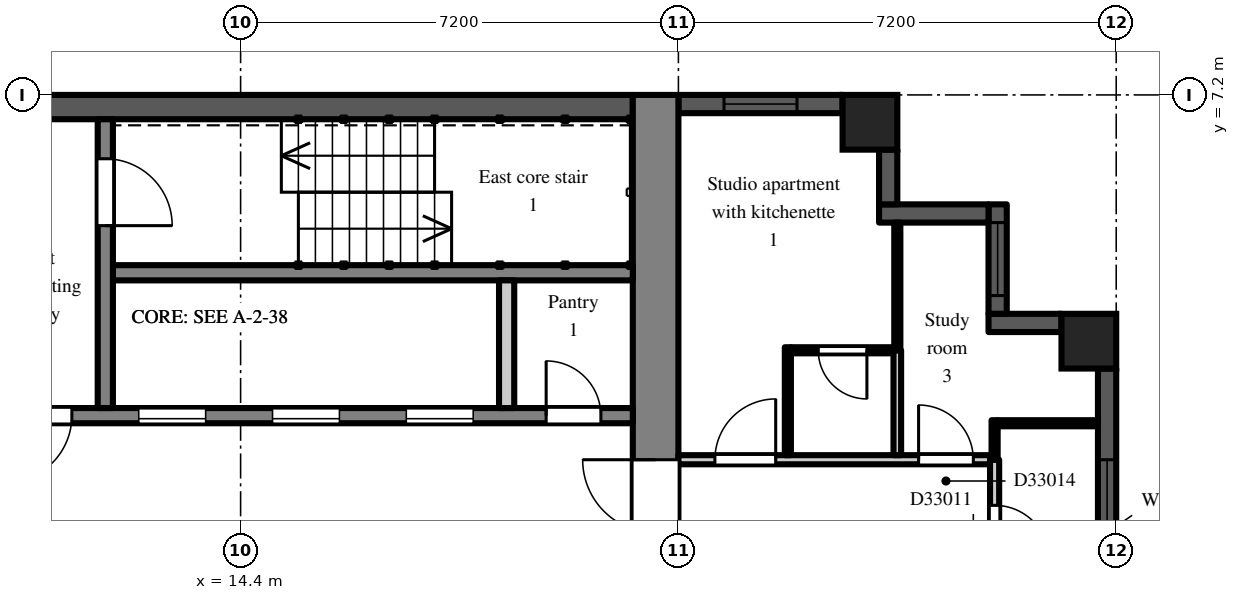
"""IFC4 building model, lengths in metres.
Left out: names, types, materials, properties, quantities, classifications, styles, units other than length and angle.
Written with IfcOpenShell. Run it as: python <this file> out.ifc"""

import sys

from ifc_helpers import new_model, si_unit, direction, frame, frame_2d, origin, origin_2d, place, context, subcontext, project, spatial, rectangle, extrude, element, fill, save


model = new_model("IFC4")
c1 = context("Model", 3, precision=1e-05, world=origin(), true_north=direction((0.0, 1.0)))
c2 = subcontext(c1, "Body", "Model", "MODEL_VIEW")
j1 = project(units=[si_unit("LENGTHUNIT", "METRE"), si_unit("PLANEANGLEUNIT", "RADIAN")], contexts=[c1])
p1 = place(None, origin())
s1 = spatial("IfcSite", under=j1, at=p1, CompositionType="ELEMENT")
p2 = place(p1, origin())
s2 = spatial("IfcBuilding", under=s1, at=p2, CompositionType="ELEMENT")
p3 = place(p2, frame((0.0, 0.0, 231.9)))
s3 = spatial("IfcBuildingStorey", under=s2, at=p3, CompositionType="ELEMENT", Elevation=231.9)
for number, where, z_axis, x_axis in (
    (1, (24.75, 6.75, 0.0), (0.0, 0.0, 1.0), (1.0, 0.0, 0.0)),
    (2, (28.35, 3.15, 0.0), (0.0, 0.0, 1.0), (1.0, 0.0, 0.0)),
):
    element("IfcColumn", number, at=place(p3, frame(where, z_axis=z_axis, x_axis=x_axis)), inside=s3, PredefinedType="COLUMN", context=c2, shape_type="SweptSolid", body=[
        extrude(rectangle(XDim=0.9, YDim=0.9, at=origin_2d()), origin(), (0.0, 0.0, 1.0), 3.0),
    ])
p4 = place(p3, frame((28.65, -2.7, 0.0), z_axis=(0.0, 0.0, 1.0), x_axis=(0.0, 1.0, 0.0)))
e3 = element("IfcWall", 3, at=p4, inside=s3, PredefinedType="SOLIDWALL", context=c2, shape_type="SweptSolid", body=[
    extrude(rectangle(XDim=5.4, YDim=0.3, at=frame_2d((2.7, 0.0))), origin(), (0.0, 0.0, 1.0), 2.3),
])
p5 = place(p4, frame((1.5, 0.0, 0.2)))
e4 = element("IfcOpeningElement", 4, at=p5, cuts=e3, PredefinedType="OPENING", context=c2, shape_type="SweptSolid", body=[
    extrude(rectangle(XDim=2.4, YDim=1.85, at=frame_2d((1.2, 0.925))), frame((0.0, 0.16, 0.0), z_axis=(0.0, -1.0, 0.0), x_axis=(1.0, 0.0, 0.0)), (0.0, 0.0, 1.0), 0.32),
])
p6 = place(p3, frame((27.9, 3.45, 0.0), z_axis=(0.0, 0.0, 1.0), x_axis=(-1.0, 0.0, 0.0)))
e5 = element("IfcWall", 5, at=p6, inside=s3, PredefinedType="SOLIDWALL", context=c2, shape_type="SweptSolid", body=[
    extrude(rectangle(XDim=1.2, YDim=0.3, at=frame_2d((0.6, 0.0))), origin(), (0.0, 0.0, 1.0), 2.6),
])
p7 = place(p3, frame((26.85, 3.6, 0.0), z_axis=(0.0, 0.0, 1.0), x_axis=(0.0, 1.0, 0.0)))
e6 = element("IfcWall", 6, at=p7, inside=s3, PredefinedType="SOLIDWALL", context=c2, shape_type="SweptSolid", body=[
    extrude(rectangle(XDim=1.8, YDim=0.3, at=frame_2d((0.9, 0.0))), origin(), (0.0, 0.0, 1.0), 2.6),
])
p8 = place(p7, frame((0.3, 0.0, 0.2)))
e7 = element("IfcOpeningElement", 7, at=p8, cuts=e6, PredefinedType="OPENING", context=c2, shape_type="SweptSolid", body=[
    extrude(rectangle(XDim=1.2, YDim=1.85, at=frame_2d((0.6, 0.925))), frame((0.0, 0.16, 0.0), z_axis=(0.0, -1.0, 0.0), x_axis=(1.0, 0.0, 0.0)), (0.0, 0.0, 1.0), 0.32),
])
p9 = place(p3, frame((26.7, 5.25, 0.0), z_axis=(0.0, 0.0, 1.0), x_axis=(-1.0, 0.0, 0.0)))
e8 = element("IfcWall", 8, at=p9, inside=s3, PredefinedType="SOLIDWALL", context=c2, shape_type="SweptSolid", body=[
    extrude(rectangle(XDim=1.8, YDim=0.3, at=frame_2d((0.9, 0.0))), origin(), (0.0, 0.0, 1.0), 2.6),
])
p10 = place(p3, frame((25.05, 5.4, 0.0), z_axis=(0.0, 0.0, 1.0), x_axis=(0.0, 1.0, 0.0)))
e9 = element("IfcWall", 9, at=p10, inside=s3, PredefinedType="SOLIDWALL", context=c2, shape_type="SweptSolid", body=[
    extrude(rectangle(XDim=0.9, YDim=0.3, at=frame_2d((0.45, 0.0))), origin(), (0.0, 0.0, 1.0), 2.6),
])
p11 = place(p3, frame((24.3, 7.05, 0.0), z_axis=(0.0, 0.0, 1.0), x_axis=(-1.0, 0.0, 0.0)))
e10 = element("IfcWall", 10, at=p11, inside=s3, PredefinedType="SOLIDWALL", context=c2, shape_type="SweptSolid", body=[
    extrude(rectangle(XDim=2.7, YDim=0.3, at=frame_2d((1.35, 0.0))), origin(), (0.0, 0.0, 1.0), 2.3),
])
p12 = place(p11, frame((0.75, 0.0, 0.2)))
e11 = element("IfcOpeningElement", 11, at=p12, cuts=e10, PredefinedType="OPENING", context=c2, shape_type="SweptSolid", body=[
    extrude(rectangle(XDim=1.2, YDim=1.85, at=frame_2d((0.6, 0.925))), frame((0.0, 0.16, 0.0), z_axis=(0.0, -1.0, 0.0), x_axis=(1.0, 0.0, 0.0)), (0.0, 0.0, 1.0), 0.32),
])
p13 = place(p3, frame((21.225, -7.2, 0.0), z_axis=(0.0, 0.0, 1.0), x_axis=(0.0, 1.0, 0.0)))
e12 = element("IfcWall", 12, at=p13, inside=s3, PredefinedType="SHEAR", context=c2, shape_type="SweptSolid", body=[
    extrude(rectangle(XDim=14.4, YDim=0.75, at=frame_2d((7.2, 0.0))), origin(), (0.0, 0.0, 1.0), 2.6),
])
p14 = place(p13, frame((6.0, 0.0, 0.0)))
e13 = element("IfcOpeningElement", 13, at=p14, cuts=e12, PredefinedType="OPENING", context=c2, shape_type="SweptSolid", body=[
    extrude(rectangle(XDim=2.4, YDim=2.2, at=frame_2d((1.2, 1.1))), frame((0.0, 0.385, 0.0), z_axis=(0.0, -1.0, 0.0), x_axis=(1.0, 0.0, 0.0)), (0.0, 0.0, 1.0), 0.77),
])
p15 = place(p3, frame((7.9, 7.0, 0.0), z_axis=(0.0, 0.0, 1.0), x_axis=(1.0, 0.0, 0.0)))
e14 = element("IfcWall", 14, at=p15, inside=s3, PredefinedType="SHEAR", context=c2, shape_type="SweptSolid", body=[
    extrude(rectangle(XDim=12.95, YDim=0.4, at=frame_2d((6.475, 0.0))), origin(), (0.0, 0.0, 1.0), 2.6),
])
p16 = place(p3, frame((7.9, 1.925, 0.0), z_axis=(0.0, 0.0, 1.0), x_axis=(1.0, 0.0, 0.0)))
e15 = element("IfcWall", 15, at=p16, inside=s3, PredefinedType="SHEAR", context=c2, shape_type="SweptSolid", body=[
    extrude(rectangle(XDim=12.95, YDim=0.25, at=frame_2d((6.475, 0.0))), origin(), (0.0, 0.0, 1.0), 2.6),
])
p17 = place(p16, frame((4.825, 0.0, 0.0)))
e16 = element("IfcOpeningElement", 16, at=p17, cuts=e15, PredefinedType="OPENING", context=c2, shape_type="SweptSolid", body=[
    extrude(rectangle(XDim=1.1, YDim=2.1, at=frame_2d((0.55, 1.05))), frame((0.0, 0.135, 0.0), z_axis=(0.0, -1.0, 0.0), x_axis=(1.0, 0.0, 0.0)), (0.0, 0.0, 1.0), 0.27),
])
p18 = place(p16, frame((7.025, 0.0, 0.0)))
e17 = element("IfcOpeningElement", 17, at=p18, cuts=e15, PredefinedType="OPENING", context=c2, shape_type="SweptSolid", body=[
    extrude(rectangle(XDim=1.1, YDim=2.1, at=frame_2d((0.55, 1.05))), frame((0.0, 0.135, 0.0), z_axis=(0.0, -1.0, 0.0), x_axis=(1.0, 0.0, 0.0)), (0.0, 0.0, 1.0), 0.27),
])
p19 = place(p16, frame((9.225, 0.0, 0.0)))
e18 = element("IfcOpeningElement", 18, at=p19, cuts=e15, PredefinedType="OPENING", context=c2, shape_type="SweptSolid", body=[
    extrude(rectangle(XDim=1.1, YDim=2.1, at=frame_2d((0.55, 1.05))), frame((0.0, 0.135, 0.0), z_axis=(0.0, -1.0, 0.0), x_axis=(1.0, 0.0, 0.0)), (0.0, 0.0, 1.0), 0.27),
])
p20 = place(p16, frame((0.525, 0.0, 0.0)))
e19 = element("IfcOpeningElement", 19, at=p20, cuts=e15, PredefinedType="OPENING", context=c2, shape_type="SweptSolid", body=[
    extrude(rectangle(XDim=0.9, YDim=2.1, at=frame_2d((0.45, 1.05))), frame((0.0, 0.135, 0.0), z_axis=(0.0, -1.0, 0.0), x_axis=(1.0, 0.0, 0.0)), (0.0, 0.0, 1.0), 0.27),
])
p21 = place(p16, frame((2.625, 0.0, 0.0)))
e20 = element("IfcOpeningElement", 20, at=p21, cuts=e15, PredefinedType="OPENING", context=c2, shape_type="SweptSolid", body=[
    extrude(rectangle(XDim=1.1, YDim=2.1, at=frame_2d((0.55, 1.05))), frame((0.0, 0.135, 0.0), z_axis=(0.0, -1.0, 0.0), x_axis=(1.0, 0.0, 0.0)), (0.0, 0.0, 1.0), 0.27),
])
p22 = place(p16, frame((11.525, 0.0, 0.0)))
e21 = element("IfcOpeningElement", 21, at=p22, cuts=e15, PredefinedType="OPENING", context=c2, shape_type="SweptSolid", body=[
    extrude(rectangle(XDim=0.9, YDim=2.1, at=frame_2d((0.45, 1.05))), frame((0.0, 0.135, 0.0), z_axis=(0.0, -1.0, 0.0), x_axis=(1.0, 0.0, 0.0)), (0.0, 0.0, 1.0), 0.27),
])
p23 = place(p3, frame((12.3, 4.275, 0.0), z_axis=(0.0, 0.0, 1.0), x_axis=(1.0, 0.0, 0.0)))
e22 = element("IfcWall", 22, at=p23, inside=s3, PredefinedType="SHEAR", context=c2, shape_type="SweptSolid", body=[
    extrude(rectangle(XDim=8.55, YDim=0.25, at=frame_2d((4.275, 0.0))), origin(), (0.0, 0.0, 1.0), 2.6),
])
p24 = place(p3, frame((12.175, 2.05, 0.0), z_axis=(0.0, 0.0, 1.0), x_axis=(0.0, 1.0, 0.0)))
e23 = element("IfcWall", 23, at=p24, inside=s3, PredefinedType="SHEAR", context=c2, shape_type="SweptSolid", body=[
    extrude(rectangle(XDim=4.75, YDim=0.25, at=frame_2d((2.375, 0.0))), origin(), (0.0, 0.0, 1.0), 2.6),
])
p25 = place(p24, frame((3.0, 0.0, 0.0)))
e24 = element("IfcOpeningElement", 24, at=p25, cuts=e23, PredefinedType="OPENING", context=c2, shape_type="SweptSolid", body=[
    extrude(rectangle(XDim=1.1, YDim=2.1, at=frame_2d((0.55, 1.05))), frame((0.0, 0.135, 0.0), z_axis=(0.0, -1.0, 0.0), x_axis=(1.0, 0.0, 0.0)), (0.0, 0.0, 1.0), 0.27),
])
p26 = place(p3, frame((18.775, 2.05, 0.0), z_axis=(0.0, 0.0, 1.0), x_axis=(0.0, 1.0, 0.0)))
e25 = element("IfcWall", 25, at=p26, inside=s3, PredefinedType="PARTITIONING", context=c2, shape_type="SweptSolid", body=[
    extrude(rectangle(XDim=2.1, YDim=0.25, at=frame_2d((1.05, 0.0))), origin(), (0.0, 0.0, 1.0), 2.6),
])
p27 = place(p3, frame((21.6, 1.2, 0.0), z_axis=(0.0, 0.0, 1.0), x_axis=(1.0, 0.0, 0.0)))
e26 = element("IfcWall", 26, at=p27, inside=s3, PredefinedType="PARTITIONING", context=c2, shape_type="SweptSolid", body=[
    extrude(rectangle(XDim=5.125, YDim=0.15, at=frame_2d((2.562, 0.0))), origin(), (0.0, 0.0, 1.0), 2.6),
])
p28 = place(p27, frame((0.6, 0.0, 0.0)))
e27 = element("IfcOpeningElement", 27, at=p28, cuts=e26, PredefinedType="OPENING", context=c2, shape_type="SweptSolid", body=[
    extrude(rectangle(XDim=1.0, YDim=2.1, at=frame_2d((0.5, 1.05))), frame((0.0, 0.085, 0.0), z_axis=(0.0, -1.0, 0.0), x_axis=(1.0, 0.0, 0.0)), (0.0, 0.0, 1.0), 0.17),
])
p29 = place(p27, frame((3.95, 0.0, 0.0)))
e28 = element("IfcOpeningElement", 28, at=p29, cuts=e26, PredefinedType="OPENING", context=c2, shape_type="SweptSolid", body=[
    extrude(rectangle(XDim=0.9, YDim=2.1, at=frame_2d((0.45, 1.05))), frame((0.0, 0.085, 0.0), z_axis=(0.0, -1.0, 0.0), x_axis=(1.0, 0.0, 0.0)), (0.0, 0.0, 1.0), 0.17),
])
p30 = place(p3, frame((23.4, 1.275, 0.0), z_axis=(0.0, 0.0, 1.0), x_axis=(0.0, 1.0, 0.0)))
e29 = element("IfcWall", 29, at=p30, inside=s3, PredefinedType="PARTITIONING", context=c2, shape_type="SweptSolid", body=[
    extrude(rectangle(XDim=1.775, YDim=0.1, at=frame_2d((0.888, 0.0))), origin(), (0.0, 0.0, 1.0), 2.6),
])
p31 = place(p3, frame((23.45, 3.0, 0.0), z_axis=(0.0, 0.0, 1.0), x_axis=(1.0, 0.0, 0.0)))
e30 = element("IfcWall", 30, at=p31, inside=s3, PredefinedType="PARTITIONING", context=c2, shape_type="SweptSolid", body=[
    extrude(rectangle(XDim=1.688, YDim=0.1, at=frame_2d((0.844, 0.0))), origin(), (0.0, 0.0, 1.0), 2.6),
])
p32 = place(p31, frame((0.45, 0.0, 0.0)))
e31 = element("IfcOpeningElement", 31, at=p32, cuts=e30, PredefinedType="OPENING", context=c2, shape_type="SweptSolid", body=[
    extrude(rectangle(XDim=0.8, YDim=2.1, at=frame_2d((0.4, 1.05))), frame((0.0, 0.06, 0.0), z_axis=(0.0, -1.0, 0.0), x_axis=(1.0, 0.0, 0.0)), (0.0, 0.0, 1.0), 0.12),
])
p33 = place(p3, frame((25.2, 1.275, 0.0), z_axis=(0.0, 0.0, 1.0), x_axis=(0.0, 1.0, 0.0)))
e32 = element("IfcWall", 32, at=p33, inside=s3, PredefinedType="PARTITIONING", context=c2, shape_type="SweptSolid", body=[
    extrude(rectangle(XDim=1.725, YDim=0.125, at=frame_2d((0.863, 0.0))), origin(), (0.0, 0.0, 1.0), 2.6),
])
p34 = place(p3, frame((25.2, 3.0, 0.0), z_axis=(0.0, 0.0, 1.0), x_axis=(0.0, 1.0, 0.0)))
e33 = element("IfcWall", 33, at=p34, inside=s3, PredefinedType="PARTITIONING", context=c2, shape_type="SweptSolid", body=[
    extrude(rectangle(XDim=2.1, YDim=0.1, at=frame_2d((1.05, 0.0))), origin(), (0.0, 0.0, 1.0), 2.6),
])
p35 = place(p3, frame((26.8, -1.2, 0.0), z_axis=(0.0, 0.0, 1.0), x_axis=(0.0, 1.0, 0.0)))
e34 = element("IfcWall", 34, at=p35, inside=s3, PredefinedType="PARTITIONING", context=c2, shape_type="SweptSolid", body=[
    extrude(rectangle(XDim=2.4, YDim=0.15, at=frame_2d((1.2, 0.0))), origin(), (0.0, 0.0, 1.0), 2.6),
])
p36 = place(p35, frame((0.75, 0.0, 0.0)))
e35 = element("IfcOpeningElement", 35, at=p36, cuts=e34, PredefinedType="OPENING", context=c2, shape_type="SweptSolid", body=[
    extrude(rectangle(XDim=0.9, YDim=2.1, at=frame_2d((0.45, 1.05))), frame((0.0, 0.085, 0.0), z_axis=(0.0, -1.0, 0.0), x_axis=(1.0, 0.0, 0.0)), (0.0, 0.0, 1.0), 0.17),
])
p37 = place(p3, frame((26.8, 1.2, 0.0), z_axis=(0.0, 0.0, 1.0), x_axis=(0.0, 1.0, 0.0)))
e36 = element("IfcWall", 36, at=p37, inside=s3, PredefinedType="PARTITIONING", context=c2, shape_type="SweptSolid", body=[
    extrude(rectangle(XDim=0.65, YDim=0.1, at=frame_2d((0.325, 0.0))), origin(), (0.0, 0.0, 1.0), 2.6),
])
p38 = place(p3, frame((26.85, 1.8, 0.0), z_axis=(0.0, 0.0, 1.0), x_axis=(1.0, 0.0, 0.0)))
e37 = element("IfcWall", 37, at=p38, inside=s3, PredefinedType="PARTITIONING", context=c2, shape_type="SweptSolid", body=[
    extrude(rectangle(XDim=1.65, YDim=0.1, at=frame_2d((0.825, 0.0))), origin(), (0.0, 0.0, 1.0), 2.6),
])
p39 = place(p5, origin())
e38 = element("IfcWindow", 38, at=p39, inside=s3, PartitioningType="SINGLE_PANEL", PredefinedType="WINDOW", context=c2, shape_type="SweptSolid", body=[
    extrude(rectangle(XDim=2.4, YDim=1.85, at=frame_2d((1.2, 0.925))), frame((0.0, 0.03, 0.0), z_axis=(0.0, -1.0, 0.0), x_axis=(1.0, 0.0, 0.0)), (0.0, 0.0, 1.0), 0.06),
])
fill(e4, e38)
p40 = place(p8, origin())
e39 = element("IfcWindow", 39, at=p40, inside=s3, PartitioningType="SINGLE_PANEL", PredefinedType="WINDOW", context=c2, shape_type="SweptSolid", body=[
    extrude(rectangle(XDim=1.2, YDim=1.85, at=frame_2d((0.6, 0.925))), frame((0.0, 0.03, 0.0), z_axis=(0.0, -1.0, 0.0), x_axis=(1.0, 0.0, 0.0)), (0.0, 0.0, 1.0), 0.06),
])
fill(e7, e39)
p41 = place(p12, origin())
e40 = element("IfcWindow", 40, at=p41, inside=s3, PartitioningType="SINGLE_PANEL", PredefinedType="WINDOW", context=c2, shape_type="SweptSolid", body=[
    extrude(rectangle(XDim=1.2, YDim=1.85, at=frame_2d((0.6, 0.925))), frame((0.0, 0.03, 0.0), z_axis=(0.0, -1.0, 0.0), x_axis=(1.0, 0.0, 0.0)), (0.0, 0.0, 1.0), 0.06),
])
fill(e11, e40)
p42 = place(p17, origin())
e41 = element("IfcDoor", 41, at=p42, inside=s3, OperationType="SLIDING_TO_LEFT", PredefinedType="DOOR", context=c2, shape_type="SweptSolid", body=[
    extrude(rectangle(XDim=1.1, YDim=2.1, at=frame_2d((0.55, 1.05))), frame((0.0, 0.025, 0.0), z_axis=(0.0, -1.0, 0.0), x_axis=(1.0, 0.0, 0.0)), (0.0, 0.0, 1.0), 0.05),
])
fill(e16, e41)
p43 = place(p18, origin())
e42 = element("IfcDoor", 42, at=p43, inside=s3, OperationType="SLIDING_TO_LEFT", PredefinedType="DOOR", context=c2, shape_type="SweptSolid", body=[
    extrude(rectangle(XDim=1.1, YDim=2.1, at=frame_2d((0.55, 1.05))), frame((0.0, 0.025, 0.0), z_axis=(0.0, -1.0, 0.0), x_axis=(1.0, 0.0, 0.0)), (0.0, 0.0, 1.0), 0.05),
])
fill(e17, e42)
p44 = place(p19, origin())
e43 = element("IfcDoor", 43, at=p44, inside=s3, OperationType="SLIDING_TO_LEFT", PredefinedType="DOOR", context=c2, shape_type="SweptSolid", body=[
    extrude(rectangle(XDim=1.1, YDim=2.1, at=frame_2d((0.55, 1.05))), frame((0.0, 0.025, 0.0), z_axis=(0.0, -1.0, 0.0), x_axis=(1.0, 0.0, 0.0)), (0.0, 0.0, 1.0), 0.05),
])
fill(e18, e43)
p45 = place(p25, frame((1.1, 0.0, 0.0), z_axis=(0.0, 0.0, 1.0), x_axis=(-1.0, 0.0, 0.0)))
e44 = element("IfcDoor", 44, at=p45, inside=s3, OperationType="SINGLE_SWING_RIGHT", PredefinedType="DOOR", context=c2, shape_type="SweptSolid", body=[
    extrude(rectangle(XDim=1.1, YDim=2.1, at=frame_2d((0.55, 1.05))), frame((0.0, 0.025, 0.0), z_axis=(0.0, -1.0, 0.0), x_axis=(1.0, 0.0, 0.0)), (0.0, 0.0, 1.0), 0.05),
])
fill(e24, e44)
p46 = place(p21, frame((1.1, 0.0, 0.0), z_axis=(0.0, 0.0, 1.0), x_axis=(-1.0, 0.0, 0.0)))
e45 = element("IfcDoor", 45, at=p46, inside=s3, OperationType="SINGLE_SWING_RIGHT", PredefinedType="DOOR", context=c2, shape_type="SweptSolid", body=[
    extrude(rectangle(XDim=1.1, YDim=2.1, at=frame_2d((0.55, 1.05))), frame((0.0, 0.025, 0.0), z_axis=(0.0, -1.0, 0.0), x_axis=(1.0, 0.0, 0.0)), (0.0, 0.0, 1.0), 0.05),
])
fill(e20, e45)
p47 = place(p14, origin())
e46 = element("IfcDoor", 46, at=p47, inside=s3, OperationType="DOUBLE_DOOR_DOUBLE_SWING", PredefinedType="DOOR", context=c2, shape_type="SweptSolid", body=[
    extrude(rectangle(XDim=2.4, YDim=2.2, at=frame_2d((1.2, 1.1))), frame((0.0, 0.025, 0.0), z_axis=(0.0, -1.0, 0.0), x_axis=(1.0, 0.0, 0.0)), (0.0, 0.0, 1.0), 0.05),
])
fill(e13, e46)
p48 = place(p22, origin())
e47 = element("IfcDoor", 47, at=p48, inside=s3, OperationType="SINGLE_SWING_LEFT", PredefinedType="DOOR", context=c2, shape_type="SweptSolid", body=[
    extrude(rectangle(XDim=0.9, YDim=2.1, at=frame_2d((0.45, 1.05))), frame((0.0, 0.025, 0.0), z_axis=(0.0, -1.0, 0.0), x_axis=(1.0, 0.0, 0.0)), (0.0, 0.0, 1.0), 0.05),
])
fill(e21, e47)
p49 = place(p36, frame((0.9, 0.0, 0.0), z_axis=(0.0, 0.0, 1.0), x_axis=(-1.0, 0.0, 0.0)))
e48 = element("IfcDoor", 48, at=p49, inside=s3, OperationType="SINGLE_SWING_RIGHT", PredefinedType="DOOR", context=c2, shape_type="SweptSolid", body=[
    extrude(rectangle(XDim=0.9, YDim=2.1, at=frame_2d((0.45, 1.05))), frame((0.0, 0.025, 0.0), z_axis=(0.0, -1.0, 0.0), x_axis=(1.0, 0.0, 0.0)), (0.0, 0.0, 1.0), 0.05),
])
fill(e35, e48)
p50 = place(p32, frame((0.8, 0.0, 0.0), z_axis=(0.0, 0.0, 1.0), x_axis=(-1.0, 0.0, 0.0)))
e49 = element("IfcDoor", 49, at=p50, inside=s3, OperationType="SINGLE_SWING_LEFT", PredefinedType="DOOR", context=c2, shape_type="SweptSolid", body=[
    extrude(rectangle(XDim=0.8, YDim=2.1, at=frame_2d((0.4, 1.05))), frame((0.0, 0.025, 0.0), z_axis=(0.0, -1.0, 0.0), x_axis=(1.0, 0.0, 0.0)), (0.0, 0.0, 1.0), 0.05),
])
fill(e31, e49)
p51 = place(p28, origin())
e50 = element("IfcDoor", 50, at=p51, inside=s3, OperationType="SINGLE_SWING_RIGHT", PredefinedType="DOOR", context=c2, shape_type="SweptSolid", body=[
    extrude(rectangle(XDim=1.0, YDim=2.1, at=frame_2d((0.5, 1.05))), frame((0.0, 0.025, 0.0), z_axis=(0.0, -1.0, 0.0), x_axis=(1.0, 0.0, 0.0)), (0.0, 0.0, 1.0), 0.05),
])
fill(e27, e50)
p52 = place(p29, origin())
e51 = element("IfcDoor", 51, at=p52, inside=s3, OperationType="SINGLE_SWING_LEFT", PredefinedType="DOOR", context=c2, shape_type="SweptSolid", body=[
    extrude(rectangle(XDim=0.9, YDim=2.1, at=frame_2d((0.45, 1.05))), frame((0.0, 0.025, 0.0), z_axis=(0.0, -1.0, 0.0), x_axis=(1.0, 0.0, 0.0)), (0.0, 0.0, 1.0), 0.05),
])
fill(e28, e51)
save(model, sys.argv[1])
